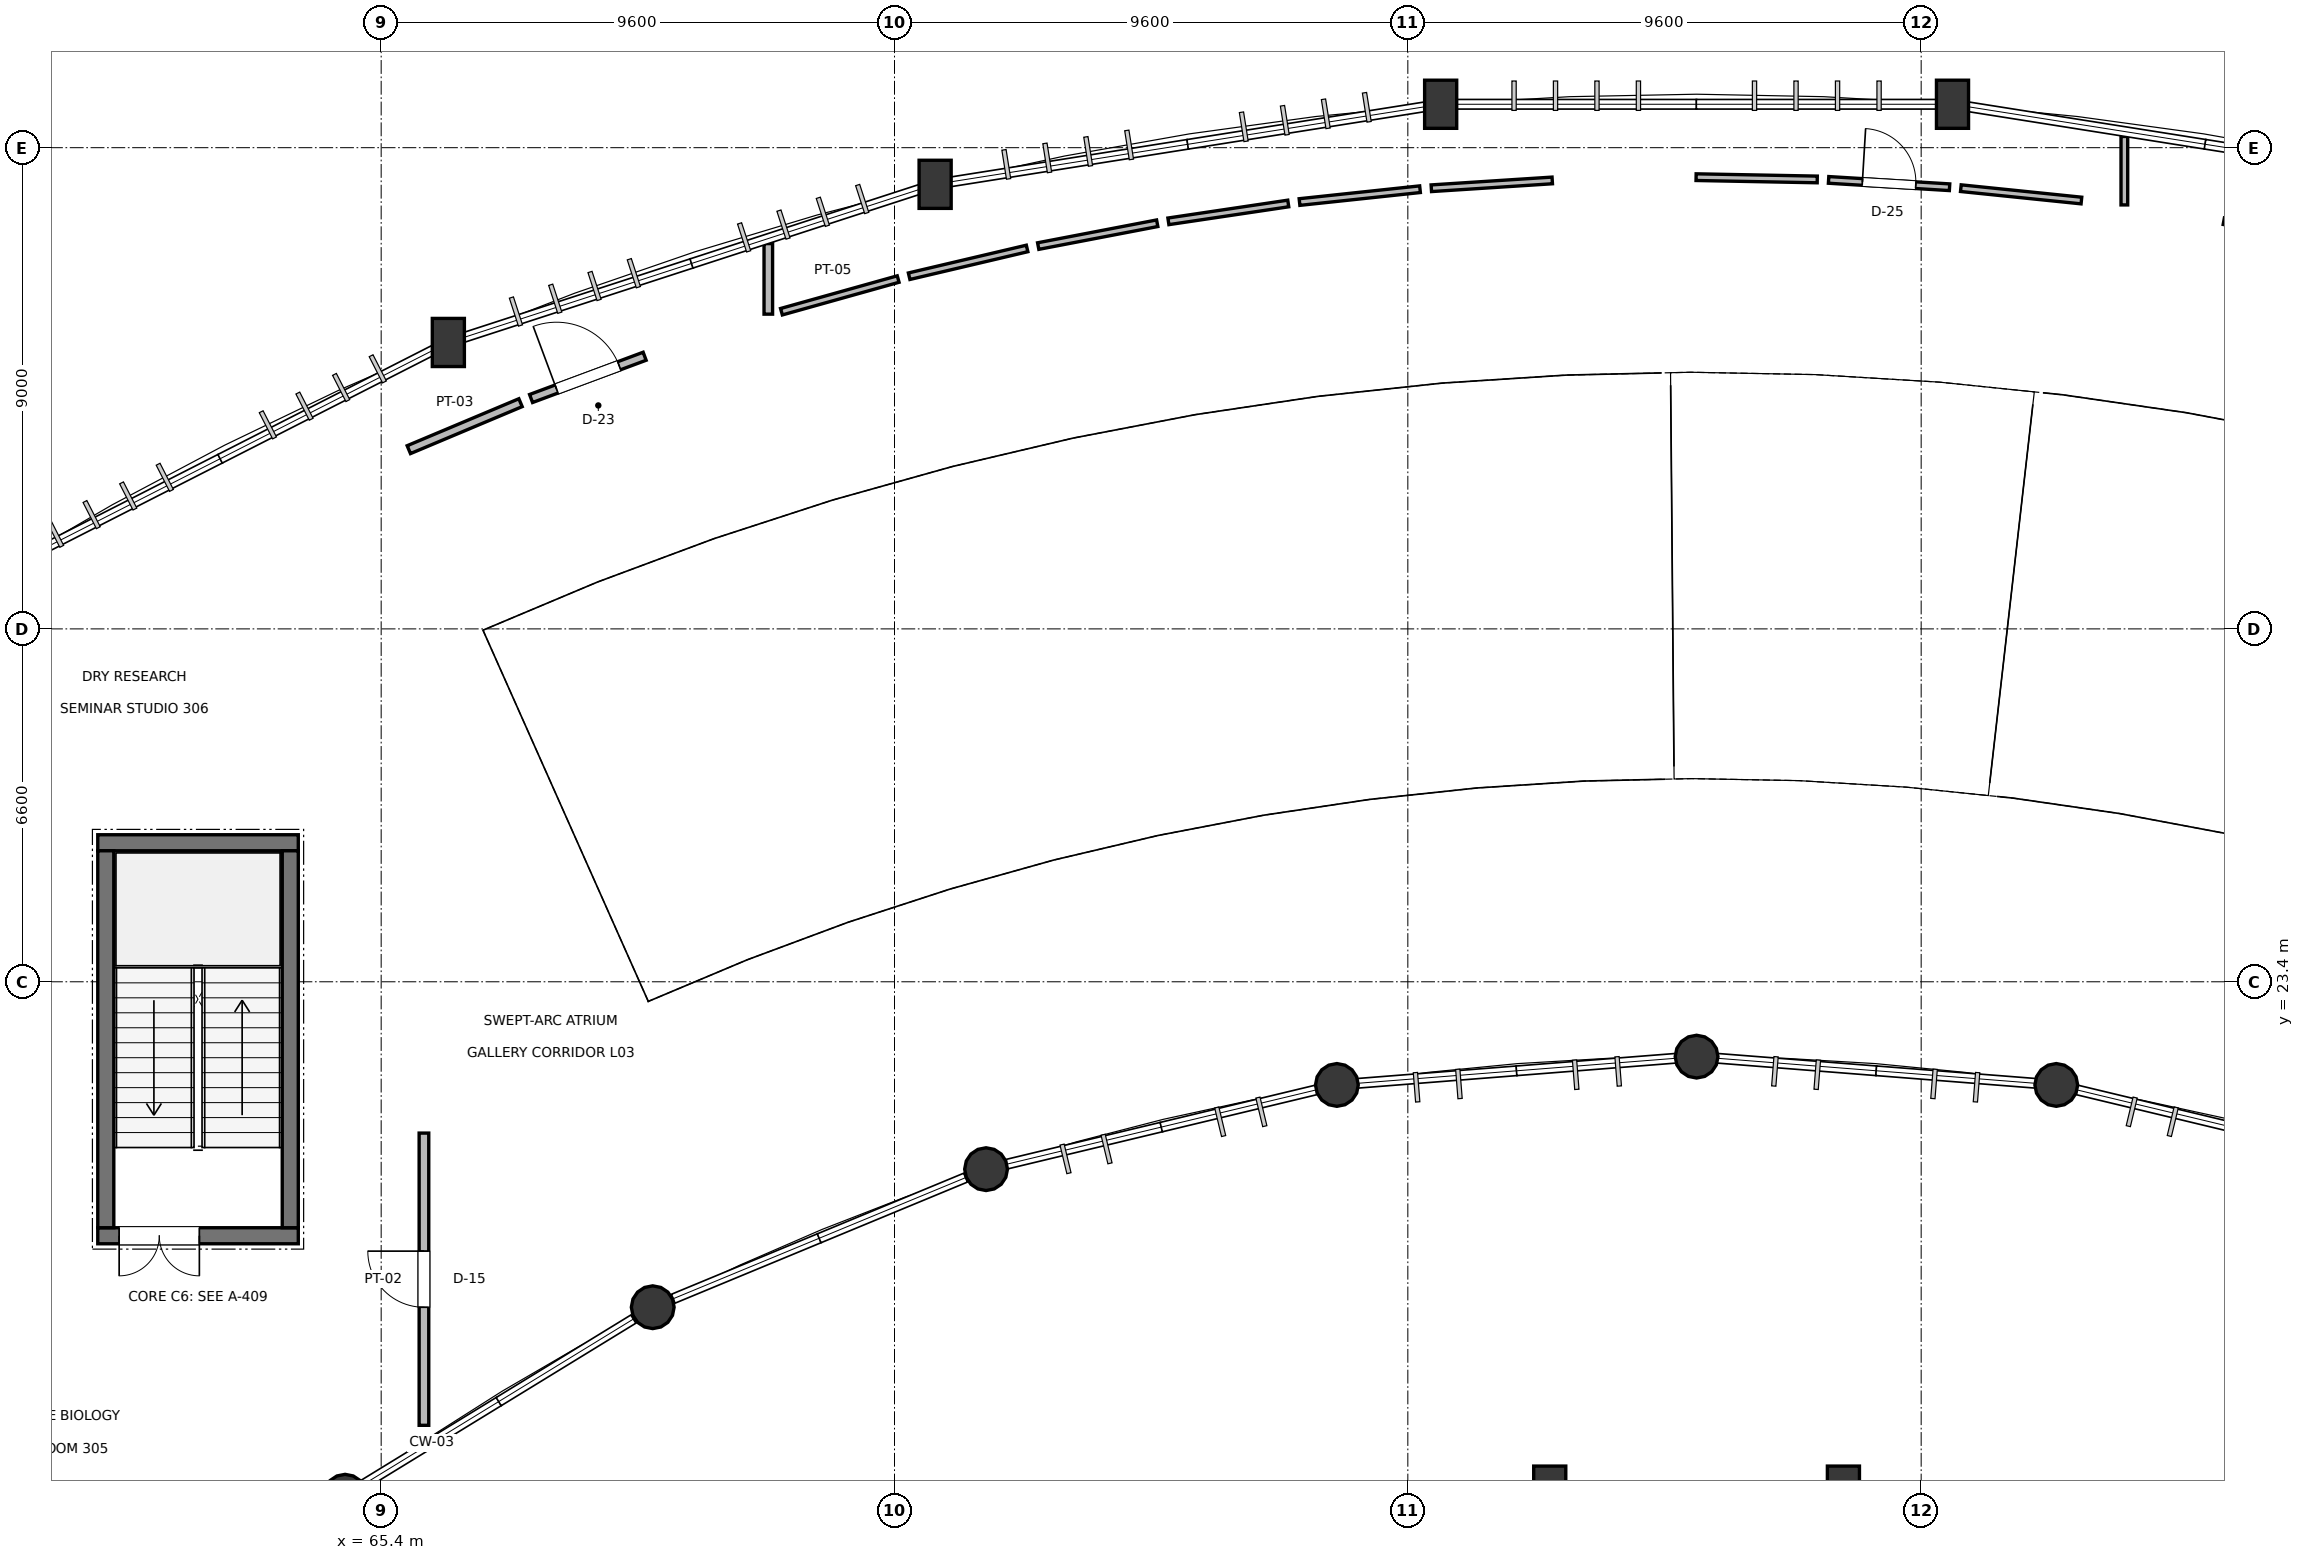
"""IFC4 building model, lengths in metres.
Left out: names, types, materials, properties, quantities, classifications, styles, units other than length and angle.
Written with IfcOpenShell. Run it as: python <this file> out.ifc"""

import sys

from ifc_helpers import new_model, si_unit, direction, frame, frame_2d, origin, origin_2d, place, context, subcontext, project, spatial, rectangle, circle, extrude, element, fill, save


model = new_model("IFC4")
c1 = context("Model", 3, precision=1e-05, world=origin(), true_north=direction((0.0, 1.0)))
c2 = subcontext(c1, "Body", "Model", "MODEL_VIEW")
j1 = project(units=[si_unit("LENGTHUNIT", "METRE"), si_unit("PLANEANGLEUNIT", "RADIAN")], contexts=[c1])
p1 = place(None, origin())
s1 = spatial("IfcSite", under=j1, at=p1, CompositionType="ELEMENT")
p2 = place(p1, origin())
s2 = spatial("IfcBuilding", under=s1, at=p2, CompositionType="ELEMENT")
p3 = place(p2, frame((0.0, 0.0, 15.0)))
s3 = spatial("IfcBuildingStorey", under=s2, at=p3, CompositionType="ELEMENT", Elevation=15.0)
for number, where, z_axis, x_axis in (
    (1, (66.656, 35.357, 0.0), (0.0, 0.0, 1.0), (1.0, 0.0, 0.0)),
    (2, (75.76, 38.315, 0.0), (0.0, 0.0, 1.0), (1.0, 0.0, 0.0)),
    (3, (87.254, 13.892, 0.0), (0.0, 0.0, 1.0), (1.0, 0.0, 0.0)),
    (4, (85.214, 39.812, 0.0), (0.0, 0.0, 1.0), (1.0, 0.0, 0.0)),
    (5, (92.746, 13.892, 0.0), (0.0, 0.0, 1.0), (1.0, 0.0, 0.0)),
    (6, (94.786, 39.812, 0.0), (0.0, 0.0, 1.0), (1.0, 0.0, 0.0)),
):
    element("IfcColumn", number, at=place(p3, frame(where, z_axis=z_axis, x_axis=x_axis)), inside=s3, PredefinedType="COLUMN", context=c2, shape_type="SweptSolid", body=[
        extrude(rectangle(XDim=0.6, YDim=0.9, at=origin_2d()), origin(), (0.0, 0.0, 1.0), 4.5),
    ])
for number, where, z_axis, x_axis in (
    (7, (64.725, 13.788, 0.0), (0.0, 0.0, 1.0), (1.0, 0.0, 0.0)),
    (8, (70.479, 17.313, 0.0), (0.0, 0.0, 1.0), (1.0, 0.0, 0.0)),
    (9, (76.712, 19.896, 0.0), (0.0, 0.0, 1.0), (1.0, 0.0, 0.0)),
    (10, (83.273, 21.471, 0.0), (0.0, 0.0, 1.0), (1.0, 0.0, 0.0)),
    (11, (90.0, 22.0, 0.0), (0.0, 0.0, 1.0), (1.0, 0.0, 0.0)),
    (12, (96.727, 21.471, 0.0), (0.0, 0.0, 1.0), (1.0, 0.0, 0.0)),
):
    element("IfcColumn", number, at=place(p3, frame(where, z_axis=z_axis, x_axis=x_axis)), inside=s3, PredefinedType="COLUMN", context=c2, shape_type="SweptSolid", body=[
        extrude(circle(Radius=0.4, at=origin_2d()), origin(), (0.0, 0.0, 1.0), 4.5),
    ])
p4 = place(p3, frame((60.1, 18.65, 0.0), z_axis=(0.0, 0.0, 1.0), x_axis=(1.0, 0.0, 0.0)))
e13 = element("IfcWall", 13, at=p4, inside=s3, PredefinedType="SHEAR", context=c2, shape_type="SweptSolid", body=[
    extrude(rectangle(XDim=3.75, YDim=0.3, at=frame_2d((1.875, 0.0))), origin(), (0.0, 0.0, 1.0), 4.28),
])
p5 = place(p4, frame((0.4, 0.0, 0.0)))
e14 = element("IfcOpeningElement", 14, at=p5, cuts=e13, PredefinedType="OPENING", context=c2, shape_type="SweptSolid", body=[
    extrude(rectangle(XDim=1.5, YDim=2.2, at=frame_2d((0.75, 1.1))), frame((0.0, 0.16, 0.0), z_axis=(0.0, -1.0, 0.0), x_axis=(1.0, 0.0, 0.0)), (0.0, 0.0, 1.0), 0.32),
])
p6 = place(p3, frame((60.1, 26.0, 0.0), z_axis=(0.0, 0.0, 1.0), x_axis=(1.0, 0.0, 0.0)))
e15 = element("IfcWall", 15, at=p6, inside=s3, PredefinedType="SHEAR", context=c2, shape_type="SweptSolid", body=[
    extrude(rectangle(XDim=3.75, YDim=0.3, at=frame_2d((1.875, 0.0))), origin(), (0.0, 0.0, 1.0), 4.28),
])
for number, where, z_axis, x_axis in (
    (16, (60.25, 18.8, 0.0), (0.0, 0.0, 1.0), (0.0, 1.0, 0.0)),
    (17, (63.7, 18.8, 0.0), (0.0, 0.0, 1.0), (0.0, 1.0, 0.0)),
):
    element("IfcWall", number, at=place(p3, frame(where, z_axis=z_axis, x_axis=x_axis)), inside=s3, PredefinedType="SHEAR", context=c2, shape_type="SweptSolid", body=[
        extrude(rectangle(XDim=7.05, YDim=0.3, at=frame_2d((3.525, 0.0))), origin(), (0.0, 0.0, 1.0), 4.28),
    ])
p7 = place(p3, frame((65.917, 33.352, 0.0), z_axis=(0.0, 0.0, 1.0), x_axis=(0.921787384168, 0.38769578072, 0.0)))
e18 = element("IfcWall", 18, at=p7, inside=s3, PredefinedType="PARTITIONING", context=c2, shape_type="SweptSolid", body=[
    extrude(rectangle(XDim=2.266, YDim=0.16, at=frame_2d((1.133, 0.0))), origin(), (0.0, 0.0, 1.0), 3.405),
])
p8 = place(p3, frame((68.203, 34.309, 0.0), z_axis=(0.0, 0.0, 1.0), x_axis=(0.937158790468, 0.348903140497, 0.0)))
e19 = element("IfcWall", 19, at=p8, inside=s3, PredefinedType="PARTITIONING", context=c2, shape_type="SweptSolid", body=[
    extrude(rectangle(XDim=2.266, YDim=0.16, at=frame_2d((1.133, 0.0))), origin(), (0.0, 0.0, 1.0), 3.405),
])
p9 = place(p8, frame((0.508, 0.0, 0.0)))
e20 = element("IfcOpeningElement", 20, at=p9, cuts=e19, PredefinedType="OPENING", context=c2, shape_type="SweptSolid", body=[
    extrude(rectangle(XDim=1.25, YDim=2.2, at=frame_2d((0.625, 1.1))), frame((0.0, 0.09, 0.0), z_axis=(0.0, -1.0, 0.0), x_axis=(1.0, 0.0, 0.0)), (0.0, 0.0, 1.0), 0.18),
])
for number, where, z_axis, x_axis in (
    (21, (72.886, 35.932, 0.0), (0.0, 0.0, 1.0), (0.963, 0.27, 0.0)),
    (22, (75.274, 36.596, 0.0), (0.0, 0.0, 1.0), (0.973, 0.229, 0.0)),
):
    element("IfcWall", number, at=place(p3, frame(where, z_axis=z_axis, x_axis=x_axis)), inside=s3, PredefinedType="PARTITIONING", context=c2, shape_type="SweptSolid", body=[
        extrude(rectangle(XDim=2.266, YDim=0.125, at=frame_2d((1.133, 0.0))), origin(), (0.0, 0.0, 1.0), 3.405),
    ])
p10 = place(p3, frame((77.688, 37.16, 0.0), z_axis=(0.0, 0.0, 1.0), x_axis=(0.982087808033, 0.188423823634, 0.0)))
e23 = element("IfcWall", 23, at=p10, inside=s3, PredefinedType="PARTITIONING", context=c2, shape_type="SweptSolid", body=[
    extrude(rectangle(XDim=2.266, YDim=0.125, at=frame_2d((1.133, 0.0))), origin(), (0.0, 0.0, 1.0), 4.18),
])
p11 = place(p3, frame((80.122, 37.622, 0.0), z_axis=(0.0, 0.0, 1.0), x_axis=(0.989080490429, 0.147376332742, 0.0)))
e24 = element("IfcWall", 24, at=p11, inside=s3, PredefinedType="PARTITIONING", context=c2, shape_type="SweptSolid", body=[
    extrude(rectangle(XDim=2.266, YDim=0.125, at=frame_2d((1.133, 0.0))), origin(), (0.0, 0.0, 1.0), 3.405),
])
p12 = place(p3, frame((82.574, 37.983, 0.0), z_axis=(0.0, 0.0, 1.0), x_axis=(0.994366469197, 0.105996815696, 0.0)))
e25 = element("IfcWall", 25, at=p12, inside=s3, PredefinedType="PARTITIONING", context=c2, shape_type="SweptSolid", body=[
    extrude(rectangle(XDim=2.266, YDim=0.125, at=frame_2d((1.133, 0.0))), origin(), (0.0, 0.0, 1.0), 3.405),
])
p13 = place(p3, frame((85.039, 38.241, 0.0), z_axis=(0.0, 0.0, 1.0), x_axis=(0.997915696942, 0.064531091706, 0.0)))
e26 = element("IfcWall", 26, at=p13, inside=s3, PredefinedType="PARTITIONING", context=c2, shape_type="SweptSolid", body=[
    extrude(rectangle(XDim=2.266, YDim=0.125, at=frame_2d((1.133, 0.0))), origin(), (0.0, 0.0, 1.0), 3.405),
])
p14 = place(p3, frame((89.991, 38.448, 0.0), z_axis=(0.0, 0.0, 1.0), x_axis=(0.999822278173, -0.018852375679, 0.0)))
e27 = element("IfcWall", 27, at=p14, inside=s3, PredefinedType="PARTITIONING", context=c2, shape_type="SweptSolid", body=[
    extrude(rectangle(XDim=2.266, YDim=0.125, at=frame_2d((1.133, 0.0))), origin(), (0.0, 0.0, 1.0), 4.18),
])
p15 = place(p3, frame((92.469, 38.397, 0.0), z_axis=(0.0, 0.0, 1.0), x_axis=(0.998159220571, -0.060647921561, 0.0)))
e28 = element("IfcWall", 28, at=p15, inside=s3, PredefinedType="PARTITIONING", context=c2, shape_type="SweptSolid", body=[
    extrude(rectangle(XDim=2.266, YDim=0.125, at=frame_2d((1.133, 0.0))), origin(), (0.0, 0.0, 1.0), 3.405),
])
p16 = place(p15, frame((0.633, 0.0, 0.0)))
e29 = element("IfcOpeningElement", 29, at=p16, cuts=e28, PredefinedType="OPENING", context=c2, shape_type="SweptSolid", body=[
    extrude(rectangle(XDim=1.0, YDim=2.15, at=frame_2d((0.5, 1.075))), frame((0.0, 0.073, 0.0), z_axis=(0.0, -1.0, 0.0), x_axis=(1.0, 0.0, 0.0)), (0.0, 0.0, 1.0), 0.145),
])
p17 = place(p3, frame((94.942, 38.243, 0.0), z_axis=(0.0, 0.0, 1.0), x_axis=(0.994772464136, -0.102116328749, 0.0)))
e30 = element("IfcWall", 30, at=p17, inside=s3, PredefinedType="PARTITIONING", context=c2, shape_type="SweptSolid", body=[
    extrude(rectangle(XDim=2.267, YDim=0.125, at=frame_2d((1.133, 0.0))), origin(), (0.0, 0.0, 1.0), 3.405),
])
p18 = place(p3, frame((99.86, 37.625, 0.0), z_axis=(0.0, 0.0, 1.0), x_axis=(0.982805045735, -0.184646262018, 0.0)))
e31 = element("IfcWall", 31, at=p18, inside=s3, PredefinedType="PARTITIONING", context=c2, shape_type="SweptSolid", body=[
    extrude(rectangle(XDim=2.266, YDim=0.125, at=frame_2d((1.133, 0.0))), origin(), (0.0, 0.0, 1.0), 4.18),
])
p19 = place(p3, frame((66.2, 15.105, 0.0), z_axis=(0.0, 0.0, 1.0), x_axis=(0.0, 1.0, 0.0)))
e32 = element("IfcWall", 32, at=p19, inside=s3, PredefinedType="PARTITIONING", context=c2, shape_type="SweptSolid", body=[
    extrude(rectangle(XDim=5.465, YDim=0.18, at=frame_2d((2.733, 0.0))), origin(), (0.0, 0.0, 1.0), 3.405),
])
p20 = place(p19, frame((2.208, 0.0, 0.0)))
e33 = element("IfcOpeningElement", 33, at=p20, cuts=e32, PredefinedType="OPENING", context=c2, shape_type="SweptSolid", body=[
    extrude(rectangle(XDim=1.05, YDim=2.2, at=frame_2d((0.525, 1.1))), frame((0.0, 0.1, 0.0), z_axis=(0.0, -1.0, 0.0), x_axis=(1.0, 0.0, 0.0)), (0.0, 0.0, 1.0), 0.2),
])
p21 = place(p3, frame((72.64, 35.887, 0.0), z_axis=(0.0, 0.0, 1.0), x_axis=(0.0, 1.0, 0.0)))
e34 = element("IfcWall", 34, at=p21, inside=s3, PredefinedType="PARTITIONING", context=c2, shape_type="SweptSolid", body=[
    extrude(rectangle(XDim=1.32, YDim=0.16, at=frame_2d((0.66, 0.0))), origin(), (0.0, 0.0, 1.0), 3.405),
])
p22 = place(p3, frame((98.0, 37.929, 0.0), z_axis=(0.0, 0.0, 1.0), x_axis=(0.0, 1.0, 0.0)))
e35 = element("IfcWall", 35, at=p22, inside=s3, PredefinedType="PARTITIONING", context=c2, shape_type="SweptSolid", body=[
    extrude(rectangle(XDim=1.281, YDim=0.125, at=frame_2d((0.64, 0.0))), origin(), (0.0, 0.0, 1.0), 3.405),
])
p23 = place(p5, frame((1.5, 0.0, 0.0), z_axis=(0.0, 0.0, 1.0), x_axis=(-1.0, 0.0, 0.0)))
e36 = element("IfcDoor", 36, at=p23, inside=s3, OperationType="DOUBLE_DOOR_SINGLE_SWING", PredefinedType="DOOR", context=c2, shape_type="SweptSolid", body=[
    extrude(rectangle(XDim=1.5, YDim=2.2, at=frame_2d((0.75, 1.1))), frame((0.0, 0.025, 0.0), z_axis=(0.0, -1.0, 0.0), x_axis=(1.0, 0.0, 0.0)), (0.0, 0.0, 1.0), 0.05),
])
fill(e14, e36)
p24 = place(p9, origin())
e37 = element("IfcDoor", 37, at=p24, inside=s3, OperationType="SINGLE_SWING_LEFT", PredefinedType="DOOR", context=c2, shape_type="SweptSolid", body=[
    extrude(rectangle(XDim=1.25, YDim=2.2, at=frame_2d((0.625, 1.1))), frame((0.0, 0.025, 0.0), z_axis=(0.0, -1.0, 0.0), x_axis=(1.0, 0.0, 0.0)), (0.0, 0.0, 1.0), 0.05),
])
fill(e20, e37)
p25 = place(p20, origin())
e38 = element("IfcDoor", 38, at=p25, inside=s3, OperationType="SINGLE_SWING_RIGHT", PredefinedType="DOOR", context=c2, shape_type="SweptSolid", body=[
    extrude(rectangle(XDim=1.05, YDim=2.2, at=frame_2d((0.525, 1.1))), frame((0.0, 0.025, 0.0), z_axis=(0.0, -1.0, 0.0), x_axis=(1.0, 0.0, 0.0)), (0.0, 0.0, 1.0), 0.05),
])
fill(e33, e38)
p26 = place(p16, origin())
e39 = element("IfcDoor", 39, at=p26, inside=s3, OperationType="SINGLE_SWING_LEFT", PredefinedType="DOOR", context=c2, shape_type="SweptSolid", body=[
    extrude(rectangle(XDim=1.0, YDim=2.15, at=frame_2d((0.5, 1.075))), frame((0.0, 0.025, 0.0), z_axis=(0.0, -1.0, 0.0), x_axis=(1.0, 0.0, 0.0)), (0.0, 0.0, 1.0), 0.05),
])
fill(e29, e39)
save(model, sys.argv[1])
